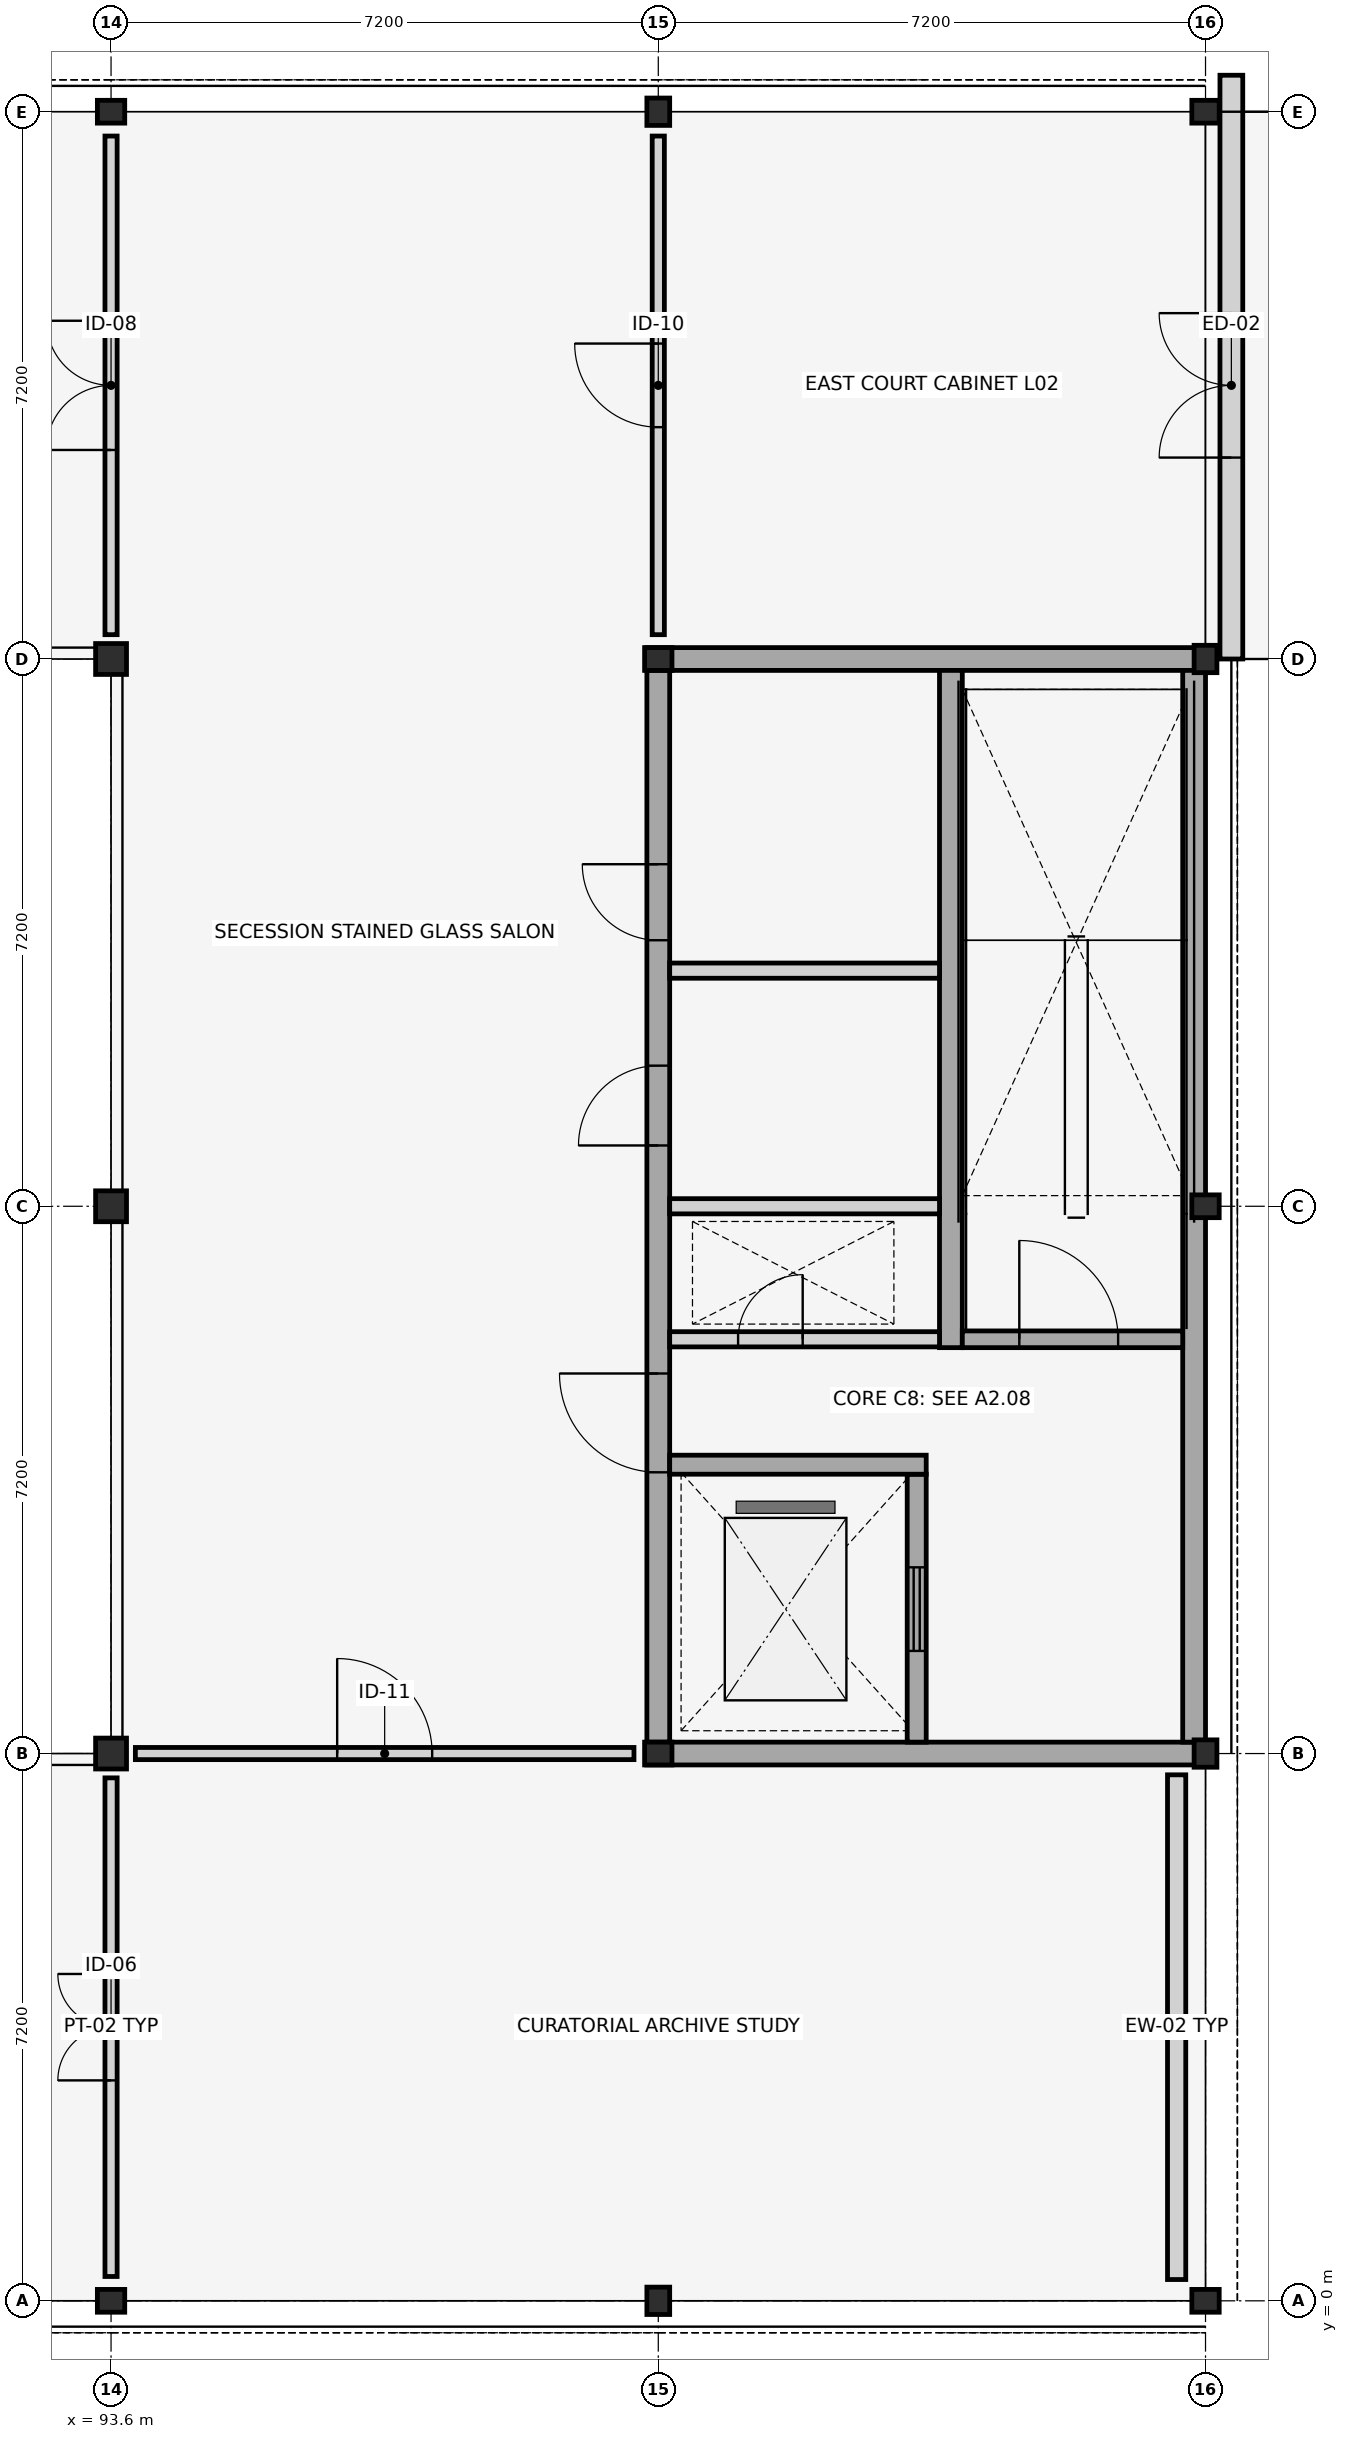
"""IFC4 building model, lengths in metres.
Left out: names, types, materials, properties, quantities, classifications, styles, units other than length and angle.
Written with IfcOpenShell. Run it as: python <this file> out.ifc"""

import sys

from ifc_helpers import new_model, si_unit, direction, frame, frame_2d, origin, origin_2d, place, context, subcontext, project, spatial, rectangle, hollow_circle, i_section, extrude, element, fill, save


model = new_model("IFC4")
c1 = context("Model", 3, precision=1e-05, world=origin(), true_north=direction((0.0, 1.0)))
c2 = subcontext(c1, "Body", "Model", "MODEL_VIEW")
j1 = project(units=[si_unit("LENGTHUNIT", "METRE"), si_unit("PLANEANGLEUNIT", "RADIAN")], contexts=[c1])
p1 = place(None, origin())
s1 = spatial("IfcSite", under=j1, at=p1, CompositionType="ELEMENT")
p2 = place(p1, origin())
s2 = spatial("IfcBuilding", under=s1, at=p2, CompositionType="ELEMENT")
p3 = place(p2, frame((0.0, 0.0, 8.7)))
s3 = spatial("IfcBuildingStorey", under=s2, at=p3, CompositionType="ELEMENT", Elevation=8.7)
p4 = place(p3, frame((93.6, 0.0, 0.0), z_axis=(0.0, 0.0, 1.0), x_axis=(0.0, 1.0, 0.0)))
e1 = element("IfcColumn", 1, at=p4, inside=s3, PredefinedType="COLUMN", context=c2, shape_type="SweptSolid", body=[
    extrude(i_section(OverallWidth=0.3, OverallDepth=0.36, WebThickness=0.012, FlangeThickness=0.022, FilletRadius=0.027, at=origin_2d()), origin(), (0.0, 0.0, 1.0), 4.2),
])
for number, where, z_axis, x_axis in (
    (2, (93.6, 7.2, 0.0), (0.0, 0.0, 1.0), (1.0, 0.0, 0.0)),
    (3, (93.6, 14.4, 0.0), (0.0, 0.0, 1.0), (0.0, 1.0, 0.0)),
    (4, (93.6, 21.6, 0.0), (0.0, 0.0, 1.0), (1.0, 0.0, 0.0)),
):
    element("IfcColumn", number, at=place(p3, frame(where, z_axis=z_axis, x_axis=x_axis)), inside=s3, PredefinedType="COLUMN", context=c2, shape_type="SweptSolid", body=[
        extrude(hollow_circle(Radius=0.203, WallThickness=0.016, at=origin_2d()), origin(), (0.0, 0.0, 1.0), 4.2),
    ])
for number, where, z_axis, x_axis in (
    (5, (93.6, 28.8, 0.0), (0.0, 0.0, 1.0), (0.0, 1.0, 0.0)),
    (6, (100.8, 0.0, 0.0), (0.0, 0.0, 1.0), (1.0, 0.0, 0.0)),
    (7, (100.8, 7.2, 0.0), (0.0, 0.0, 1.0), (0.0, 1.0, 0.0)),
    (8, (100.8, 21.6, 0.0), (0.0, 0.0, 1.0), (0.0, 1.0, 0.0)),
    (9, (100.8, 28.8, 0.0), (0.0, 0.0, 1.0), (1.0, 0.0, 0.0)),
    (10, (108.0, 0.0, 0.0), (0.0, 0.0, 1.0), (0.0, 1.0, 0.0)),
    (11, (108.0, 7.2, 0.0), (0.0, 0.0, 1.0), (1.0, 0.0, 0.0)),
    (12, (108.0, 14.4, 0.0), (0.0, 0.0, 1.0), (0.0, 1.0, 0.0)),
    (13, (108.0, 21.6, 0.0), (0.0, 0.0, 1.0), (1.0, 0.0, 0.0)),
    (14, (108.0, 28.8, 0.0), (0.0, 0.0, 1.0), (0.0, 1.0, 0.0)),
):
    element("IfcColumn", number, at=place(p3, frame(where, z_axis=z_axis, x_axis=x_axis)), inside=s3, PredefinedType="COLUMN", context=c2, shape_type="SweptSolid", body=[
        extrude(i_section(OverallWidth=0.3, OverallDepth=0.36, WebThickness=0.012, FlangeThickness=0.022, FilletRadius=0.027, at=origin_2d()), origin(), (0.0, 0.0, 1.0), 4.2),
    ])
p5 = place(p3, frame((107.62, 0.28, 0.0), z_axis=(0.0, 0.0, 1.0), x_axis=(0.0, 1.0, 0.0)))
e15 = element("IfcWall", 15, at=p5, inside=s3, PredefinedType="STANDARD", context=c2, shape_type="SweptSolid", body=[
    extrude(rectangle(XDim=6.64, YDim=0.24, at=frame_2d((3.32, 0.0))), origin(), (0.0, 0.0, 1.0), 3.56),
])
p6 = place(p3, frame((108.34, 21.6, 0.0), z_axis=(0.0, 0.0, 1.0), x_axis=(0.0, 1.0, 0.0)))
e16 = element("IfcWall", 16, at=p6, inside=s3, PredefinedType="STANDARD", context=c2, shape_type="SweptSolid", body=[
    extrude(rectangle(XDim=7.68, YDim=0.3, at=frame_2d((3.84, 0.0))), origin(), (0.0, 0.0, 1.0), 3.65),
])
p7 = place(p6, frame((2.65, 0.0, 0.0)))
e17 = element("IfcOpeningElement", 17, at=p7, cuts=e16, PredefinedType="OPENING", context=c2, shape_type="SweptSolid", body=[
    extrude(rectangle(XDim=1.9, YDim=2.45, at=frame_2d((0.95, 1.225))), frame((0.0, 0.16, 0.0), z_axis=(0.0, -1.0, 0.0), x_axis=(1.0, 0.0, 0.0)), (0.0, 0.0, 1.0), 0.32),
])
for number, where, z_axis, x_axis in (
    (18, (100.65, 7.2, 0.0), (0.0, 0.0, 1.0), (1.0, 0.0, 0.0)),
    (19, (100.65, 21.6, 0.0), (0.0, 0.0, 1.0), (1.0, 0.0, 0.0)),
):
    element("IfcWall", number, at=place(p3, frame(where, z_axis=z_axis, x_axis=x_axis)), inside=s3, PredefinedType="SHEAR", context=c2, shape_type="SweptSolid", body=[
        extrude(rectangle(XDim=7.35, YDim=0.3, at=frame_2d((3.675, 0.0))), origin(), (0.0, 0.0, 1.0), 3.96),
    ])
p8 = place(p3, frame((107.85, 7.35, 0.0), z_axis=(0.0, 0.0, 1.0), x_axis=(0.0, 1.0, 0.0)))
e20 = element("IfcWall", 20, at=p8, inside=s3, PredefinedType="SHEAR", context=c2, shape_type="SweptSolid", body=[
    extrude(rectangle(XDim=14.1, YDim=0.3, at=frame_2d((7.05, 0.0))), origin(), (0.0, 0.0, 1.0), 3.96),
])
p9 = place(p3, frame((100.8, 7.35, 0.0), z_axis=(0.0, 0.0, 1.0), x_axis=(0.0, 1.0, 0.0)))
e21 = element("IfcWall", 21, at=p9, inside=s3, PredefinedType="SHEAR", context=c2, shape_type="SweptSolid", body=[
    extrude(rectangle(XDim=14.1, YDim=0.3, at=frame_2d((7.05, 0.0))), origin(), (0.0, 0.0, 1.0), 3.96),
])
p10 = place(p9, frame((3.55, 0.0, 0.0)))
e22 = element("IfcOpeningElement", 22, at=p10, cuts=e21, PredefinedType="OPENING", context=c2, shape_type="SweptSolid", body=[
    extrude(rectangle(XDim=1.3, YDim=2.2, at=frame_2d((0.65, 1.1))), frame((0.0, 0.16, 0.0), z_axis=(0.0, -1.0, 0.0), x_axis=(1.0, 0.0, 0.0)), (0.0, 0.0, 1.0), 0.32),
])
p11 = place(p9, frame((7.85, 0.0, 0.0)))
e23 = element("IfcOpeningElement", 23, at=p11, cuts=e21, PredefinedType="OPENING", context=c2, shape_type="SweptSolid", body=[
    extrude(rectangle(XDim=1.05, YDim=2.15, at=frame_2d((0.525, 1.075))), frame((0.0, 0.16, 0.0), z_axis=(0.0, -1.0, 0.0), x_axis=(1.0, 0.0, 0.0)), (0.0, 0.0, 1.0), 0.32),
])
p12 = place(p9, frame((10.55, 0.0, 0.0)))
e24 = element("IfcOpeningElement", 24, at=p12, cuts=e21, PredefinedType="OPENING", context=c2, shape_type="SweptSolid", body=[
    extrude(rectangle(XDim=1.0, YDim=2.15, at=frame_2d((0.5, 1.075))), frame((0.0, 0.16, 0.0), z_axis=(0.0, -1.0, 0.0), x_axis=(1.0, 0.0, 0.0)), (0.0, 0.0, 1.0), 0.32),
])
p13 = place(p3, frame((104.2, 7.35, 0.0), z_axis=(0.0, 0.0, 1.0), x_axis=(0.0, 1.0, 0.0)))
e25 = element("IfcWall", 25, at=p13, inside=s3, PredefinedType="SHEAR", context=c2, shape_type="SweptSolid", body=[
    extrude(rectangle(XDim=3.525, YDim=0.25, at=frame_2d((1.762, 0.0))), origin(), (0.0, 0.0, 1.0), 3.96),
])
p14 = place(p13, frame((1.2, 0.0, 0.0)))
e26 = element("IfcOpeningElement", 26, at=p14, cuts=e25, PredefinedType="OPENING", context=c2, shape_type="SweptSolid", body=[
    extrude(rectangle(XDim=1.1, YDim=2.15, at=frame_2d((0.55, 1.075))), frame((0.0, 0.135, 0.0), z_axis=(0.0, -1.0, 0.0), x_axis=(1.0, 0.0, 0.0)), (0.0, 0.0, 1.0), 0.27),
])
p15 = place(p3, frame((104.65, 12.54, 0.0), z_axis=(0.0, 0.0, 1.0), x_axis=(0.0, 1.0, 0.0)))
e27 = element("IfcWall", 27, at=p15, inside=s3, PredefinedType="SHEAR", context=c2, shape_type="SweptSolid", body=[
    extrude(rectangle(XDim=8.91, YDim=0.3, at=frame_2d((4.455, 0.0))), origin(), (0.0, 0.0, 1.0), 3.96),
])
p16 = place(p3, frame((100.95, 12.65, 0.0), z_axis=(0.0, 0.0, 1.0), x_axis=(1.0, 0.0, 0.0)))
e28 = element("IfcWall", 28, at=p16, inside=s3, PredefinedType="PLUMBINGWALL", context=c2, shape_type="SweptSolid", body=[
    extrude(rectangle(XDim=3.55, YDim=0.2, at=frame_2d((1.775, 0.0))), origin(), (0.0, 0.0, 1.0), 3.38),
])
p17 = place(p16, frame((0.9, 0.0, 0.0)))
e29 = element("IfcOpeningElement", 29, at=p17, cuts=e28, PredefinedType="OPENING", context=c2, shape_type="SweptSolid", body=[
    extrude(rectangle(XDim=0.85, YDim=2.05, at=frame_2d((0.425, 1.025))), frame((0.0, 0.11, 0.0), z_axis=(0.0, -1.0, 0.0), x_axis=(1.0, 0.0, 0.0)), (0.0, 0.0, 1.0), 0.22),
])
p18 = place(p3, frame((104.8, 12.65, 0.0), z_axis=(0.0, 0.0, 1.0), x_axis=(1.0, 0.0, 0.0)))
e30 = element("IfcWall", 30, at=p18, inside=s3, PredefinedType="SHEAR", context=c2, shape_type="SweptSolid", body=[
    extrude(rectangle(XDim=2.9, YDim=0.22, at=frame_2d((1.45, 0.0))), origin(), (0.0, 0.0, 1.0), 3.96),
])
p19 = place(p18, frame((0.75, 0.0, 0.0)))
e31 = element("IfcOpeningElement", 31, at=p19, cuts=e30, PredefinedType="OPENING", context=c2, shape_type="SweptSolid", body=[
    extrude(rectangle(XDim=1.3, YDim=2.2, at=frame_2d((0.65, 1.1))), frame((0.0, 0.12, 0.0), z_axis=(0.0, -1.0, 0.0), x_axis=(1.0, 0.0, 0.0)), (0.0, 0.0, 1.0), 0.24),
])
p20 = place(p3, frame((100.95, 11.0, 0.0), z_axis=(0.0, 0.0, 1.0), x_axis=(1.0, 0.0, 0.0)))
e32 = element("IfcWall", 32, at=p20, inside=s3, PredefinedType="SHEAR", context=c2, shape_type="SweptSolid", body=[
    extrude(rectangle(XDim=3.375, YDim=0.25, at=frame_2d((1.688, 0.0))), origin(), (0.0, 0.0, 1.0), 3.96),
])
for number, where, z_axis, x_axis in (
    (33, (100.95, 14.4, 0.0), (0.0, 0.0, 1.0), (1.0, 0.0, 0.0)),
    (34, (100.95, 17.5, 0.0), (0.0, 0.0, 1.0), (1.0, 0.0, 0.0)),
):
    element("IfcWall", number, at=place(p3, frame(where, z_axis=z_axis, x_axis=x_axis)), inside=s3, PredefinedType="PLUMBINGWALL", context=c2, shape_type="SweptSolid", body=[
        extrude(rectangle(XDim=3.55, YDim=0.2, at=frame_2d((1.775, 0.0))), origin(), (0.0, 0.0, 1.0), 3.38),
    ])
p21 = place(p3, frame((93.6, 0.32, 0.0), z_axis=(0.0, 0.0, 1.0), x_axis=(0.0, 1.0, 0.0)))
e35 = element("IfcWall", 35, at=p21, inside=s3, PredefinedType="PARTITIONING", context=c2, shape_type="SweptSolid", body=[
    extrude(rectangle(XDim=6.56, YDim=0.16, at=frame_2d((3.28, 0.0))), origin(), (0.0, 0.0, 1.0), 3.15),
])
p22 = place(p21, frame((2.58, 0.0, 0.0)))
e36 = element("IfcOpeningElement", 36, at=p22, cuts=e35, PredefinedType="OPENING", context=c2, shape_type="SweptSolid", body=[
    extrude(rectangle(XDim=1.4, YDim=2.3, at=frame_2d((0.7, 1.15))), frame((0.0, 0.09, 0.0), z_axis=(0.0, -1.0, 0.0), x_axis=(1.0, 0.0, 0.0)), (0.0, 0.0, 1.0), 0.18),
])
p23 = place(p3, frame((93.6, 21.92, 0.0), z_axis=(0.0, 0.0, 1.0), x_axis=(0.0, 1.0, 0.0)))
e37 = element("IfcWall", 37, at=p23, inside=s3, PredefinedType="PARTITIONING", context=c2, shape_type="SweptSolid", body=[
    extrude(rectangle(XDim=6.56, YDim=0.16, at=frame_2d((3.28, 0.0))), origin(), (0.0, 0.0, 1.0), 3.15),
])
p24 = place(p23, frame((2.43, 0.0, 0.0)))
e38 = element("IfcOpeningElement", 38, at=p24, cuts=e37, PredefinedType="OPENING", context=c2, shape_type="SweptSolid", body=[
    extrude(rectangle(XDim=1.7, YDim=2.4, at=frame_2d((0.85, 1.2))), frame((0.0, 0.09, 0.0), z_axis=(0.0, -1.0, 0.0), x_axis=(1.0, 0.0, 0.0)), (0.0, 0.0, 1.0), 0.18),
])
p25 = place(p3, frame((100.8, 21.92, 0.0), z_axis=(0.0, 0.0, 1.0), x_axis=(0.0, 1.0, 0.0)))
e39 = element("IfcWall", 39, at=p25, inside=s3, PredefinedType="PARTITIONING", context=c2, shape_type="SweptSolid", body=[
    extrude(rectangle(XDim=6.56, YDim=0.16, at=frame_2d((3.28, 0.0))), origin(), (0.0, 0.0, 1.0), 3.15),
])
p26 = place(p25, frame((2.73, 0.0, 0.0)))
e40 = element("IfcOpeningElement", 40, at=p26, cuts=e39, PredefinedType="OPENING", context=c2, shape_type="SweptSolid", body=[
    extrude(rectangle(XDim=1.1, YDim=2.2, at=frame_2d((0.55, 1.1))), frame((0.0, 0.09, 0.0), z_axis=(0.0, -1.0, 0.0), x_axis=(1.0, 0.0, 0.0)), (0.0, 0.0, 1.0), 0.18),
])
p27 = place(p3, frame((93.92, 7.2, 0.0), z_axis=(0.0, 0.0, 1.0), x_axis=(1.0, 0.0, 0.0)))
e41 = element("IfcWall", 41, at=p27, inside=s3, PredefinedType="PARTITIONING", context=c2, shape_type="SweptSolid", body=[
    extrude(rectangle(XDim=6.56, YDim=0.16, at=frame_2d((3.28, 0.0))), origin(), (0.0, 0.0, 1.0), 3.15),
])
p28 = place(p27, frame((2.655, 0.0, 0.0)))
e42 = element("IfcOpeningElement", 42, at=p28, cuts=e41, PredefinedType="OPENING", context=c2, shape_type="SweptSolid", body=[
    extrude(rectangle(XDim=1.25, YDim=2.3, at=frame_2d((0.625, 1.15))), frame((0.0, 0.09, 0.0), z_axis=(0.0, -1.0, 0.0), x_axis=(1.0, 0.0, 0.0)), (0.0, 0.0, 1.0), 0.18),
])
p29 = place(p7, origin())
e43 = element("IfcDoor", 43, at=p29, inside=s3, OperationType="DOUBLE_DOOR_SINGLE_SWING", PredefinedType="DOOR", context=c2, shape_type="SweptSolid", body=[
    extrude(rectangle(XDim=1.9, YDim=2.45, at=frame_2d((0.95, 1.225))), frame((0.0, 0.025, 0.0), z_axis=(0.0, -1.0, 0.0), x_axis=(1.0, 0.0, 0.0)), (0.0, 0.0, 1.0), 0.05),
])
fill(e17, e43)
p30 = place(p10, origin())
e44 = element("IfcDoor", 44, at=p30, inside=s3, OperationType="SINGLE_SWING_RIGHT", PredefinedType="DOOR", context=c2, shape_type="SweptSolid", body=[
    extrude(rectangle(XDim=1.3, YDim=2.2, at=frame_2d((0.65, 1.1))), frame((0.0, 0.025, 0.0), z_axis=(0.0, -1.0, 0.0), x_axis=(1.0, 0.0, 0.0)), (0.0, 0.0, 1.0), 0.05),
])
fill(e22, e44)
p31 = place(p11, origin())
e45 = element("IfcDoor", 45, at=p31, inside=s3, OperationType="SINGLE_SWING_LEFT", PredefinedType="DOOR", context=c2, shape_type="SweptSolid", body=[
    extrude(rectangle(XDim=1.05, YDim=2.15, at=frame_2d((0.525, 1.075))), frame((0.0, 0.025, 0.0), z_axis=(0.0, -1.0, 0.0), x_axis=(1.0, 0.0, 0.0)), (0.0, 0.0, 1.0), 0.05),
])
fill(e23, e45)
p32 = place(p12, origin())
e46 = element("IfcDoor", 46, at=p32, inside=s3, OperationType="SINGLE_SWING_RIGHT", PredefinedType="DOOR", context=c2, shape_type="SweptSolid", body=[
    extrude(rectangle(XDim=1.0, YDim=2.15, at=frame_2d((0.5, 1.075))), frame((0.0, 0.025, 0.0), z_axis=(0.0, -1.0, 0.0), x_axis=(1.0, 0.0, 0.0)), (0.0, 0.0, 1.0), 0.05),
])
fill(e24, e46)
p33 = place(p14, origin())
e47 = element("IfcDoor", 47, at=p33, inside=s3, OperationType="SLIDING_TO_LEFT", PredefinedType="DOOR", context=c2, shape_type="SweptSolid", body=[
    extrude(rectangle(XDim=1.1, YDim=2.15, at=frame_2d((0.55, 1.075))), frame((0.0, 0.025, 0.0), z_axis=(0.0, -1.0, 0.0), x_axis=(1.0, 0.0, 0.0)), (0.0, 0.0, 1.0), 0.05),
])
fill(e26, e47)
p34 = place(p17, origin())
e48 = element("IfcDoor", 48, at=p34, inside=s3, OperationType="SINGLE_SWING_RIGHT", PredefinedType="TRAPDOOR", context=c2, shape_type="SweptSolid", body=[
    extrude(rectangle(XDim=0.85, YDim=2.05, at=frame_2d((0.425, 1.025))), frame((0.0, 0.025, 0.0), z_axis=(0.0, -1.0, 0.0), x_axis=(1.0, 0.0, 0.0)), (0.0, 0.0, 1.0), 0.05),
])
fill(e29, e48)
p35 = place(p19, origin())
e49 = element("IfcDoor", 49, at=p35, inside=s3, OperationType="SINGLE_SWING_LEFT", PredefinedType="DOOR", context=c2, shape_type="SweptSolid", body=[
    extrude(rectangle(XDim=1.3, YDim=2.2, at=frame_2d((0.65, 1.1))), frame((0.0, 0.025, 0.0), z_axis=(0.0, -1.0, 0.0), x_axis=(1.0, 0.0, 0.0)), (0.0, 0.0, 1.0), 0.05),
])
fill(e31, e49)
p36 = place(p22, origin())
e50 = element("IfcDoor", 50, at=p36, inside=s3, OperationType="DOUBLE_DOOR_SINGLE_SWING", PredefinedType="DOOR", context=c2, shape_type="SweptSolid", body=[
    extrude(rectangle(XDim=1.4, YDim=2.3, at=frame_2d((0.7, 1.15))), frame((0.0, 0.025, 0.0), z_axis=(0.0, -1.0, 0.0), x_axis=(1.0, 0.0, 0.0)), (0.0, 0.0, 1.0), 0.05),
])
fill(e36, e50)
p37 = place(p24, origin())
e51 = element("IfcDoor", 51, at=p37, inside=s3, OperationType="DOUBLE_DOOR_SINGLE_SWING", PredefinedType="DOOR", context=c2, shape_type="SweptSolid", body=[
    extrude(rectangle(XDim=1.7, YDim=2.4, at=frame_2d((0.85, 1.2))), frame((0.0, 0.025, 0.0), z_axis=(0.0, -1.0, 0.0), x_axis=(1.0, 0.0, 0.0)), (0.0, 0.0, 1.0), 0.05),
])
fill(e38, e51)
p38 = place(p26, origin())
e52 = element("IfcDoor", 52, at=p38, inside=s3, OperationType="SINGLE_SWING_RIGHT", PredefinedType="DOOR", context=c2, shape_type="SweptSolid", body=[
    extrude(rectangle(XDim=1.1, YDim=2.2, at=frame_2d((0.55, 1.1))), frame((0.0, 0.025, 0.0), z_axis=(0.0, -1.0, 0.0), x_axis=(1.0, 0.0, 0.0)), (0.0, 0.0, 1.0), 0.05),
])
fill(e40, e52)
p39 = place(p28, origin())
e53 = element("IfcDoor", 53, at=p39, inside=s3, OperationType="SINGLE_SWING_LEFT", PredefinedType="DOOR", context=c2, shape_type="SweptSolid", body=[
    extrude(rectangle(XDim=1.25, YDim=2.3, at=frame_2d((0.625, 1.15))), frame((0.0, 0.025, 0.0), z_axis=(0.0, -1.0, 0.0), x_axis=(1.0, 0.0, 0.0)), (0.0, 0.0, 1.0), 0.05),
])
fill(e42, e53)
save(model, sys.argv[1])
